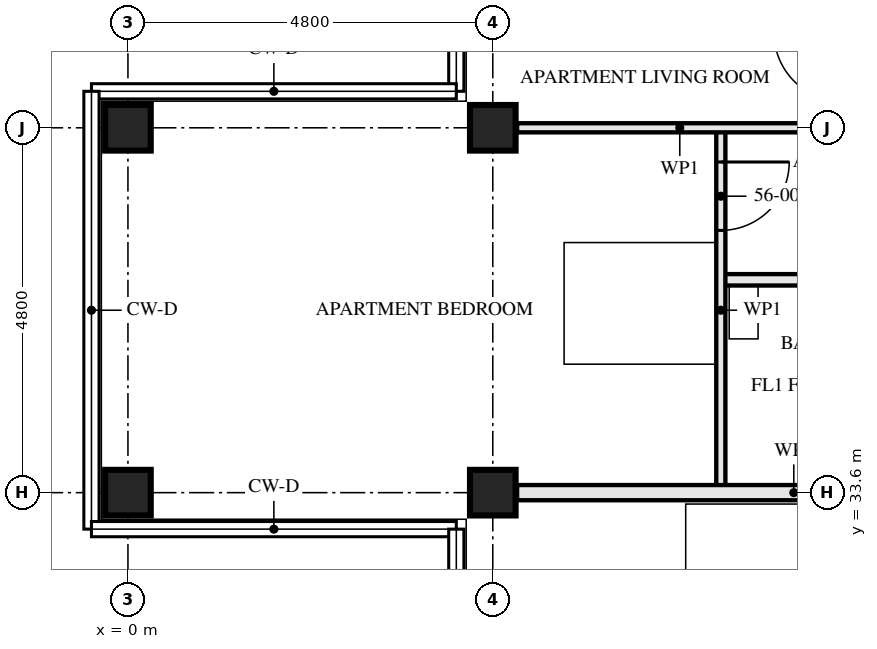
"""IFC4 building model, lengths in metres.
Left out: names, types, materials, properties, quantities, classifications, styles, units other than length and angle.
Written with IfcOpenShell. Run it as: python <this file> out.ifc"""

import sys

from ifc_helpers import new_model, si_unit, direction, frame, frame_2d, origin, origin_2d, place, context, subcontext, project, spatial, rectangle, hollow_rectangle, extrude, element, fill, save


model = new_model("IFC4")
c1 = context("Model", 3, precision=1e-05, world=origin(), true_north=direction((0.0, 1.0)))
c2 = subcontext(c1, "Body", "Model", "MODEL_VIEW")
j1 = project(units=[si_unit("LENGTHUNIT", "METRE"), si_unit("PLANEANGLEUNIT", "RADIAN")], contexts=[c1])
p1 = place(None, origin())
s1 = spatial("IfcSite", under=j1, at=p1, CompositionType="ELEMENT")
p2 = place(p1, origin())
s2 = spatial("IfcBuilding", under=s1, at=p2, CompositionType="ELEMENT")
p3 = place(p2, frame((0.0, 0.0, 205.0)))
s3 = spatial("IfcBuildingStorey", under=s2, at=p3, CompositionType="ELEMENT", Elevation=205.0)
for number, where, z_axis, x_axis in (
    (1, (0.0, 33.6, 0.0), (0.0, 0.0, 1.0), (0.0, 1.0, 0.0)),
    (2, (0.0, 38.4, 0.0), (0.0, 0.0, 1.0), (0.0, 1.0, 0.0)),
    (3, (4.8, 33.6, 0.0), (0.0, 0.0, 1.0), (0.0, 1.0, 0.0)),
    (4, (4.8, 38.4, 0.0), (0.0, 0.0, 1.0), (0.0, 1.0, 0.0)),
):
    element("IfcColumn", number, at=place(p3, frame(where, z_axis=z_axis, x_axis=x_axis)), inside=s3, PredefinedType="COLUMN", context=c2, shape_type="SweptSolid", body=[
        extrude(hollow_rectangle(XDim=0.6, YDim=0.6, WallThickness=0.05, at=origin_2d()), origin(), (0.0, 0.0, 1.0), 3.5),
    ])
p4 = place(p3, frame((7.8, 36.4, 0.0), z_axis=(0.0, 0.0, 1.0), x_axis=(1.0, 0.0, 0.0)))
e5 = element("IfcWall", 5, at=p4, inside=s3, PredefinedType="PARTITIONING", context=c2, shape_type="SweptSolid", body=[
    extrude(rectangle(XDim=3.0, YDim=0.15, at=frame_2d((1.5, 0.0))), origin(), (0.0, 0.0, 1.0), 3.33),
])
p5 = place(p4, frame((1.05, 0.0, 0.0)))
e6 = element("IfcOpeningElement", 6, at=p5, cuts=e5, PredefinedType="OPENING", context=c2, shape_type="SweptSolid", body=[
    extrude(rectangle(XDim=0.9, YDim=2.1, at=frame_2d((0.45, 1.05))), frame((0.0, 0.085, 0.0), z_axis=(0.0, -1.0, 0.0), x_axis=(1.0, 0.0, 0.0)), (0.0, 0.0, 1.0), 0.171),
])
p6 = place(p3, frame((7.8, 38.4, 0.0), z_axis=(0.0, 0.0, 1.0), x_axis=(0.0, -1.0, 0.0)))
e7 = element("IfcWall", 7, at=p6, inside=s3, PredefinedType="PARTITIONING", context=c2, shape_type="SweptSolid", body=[
    extrude(rectangle(XDim=4.8, YDim=0.12, at=frame_2d((2.4, 0.0))), origin(), (0.0, 0.0, 1.0), 3.33),
])
p7 = place(p6, frame((0.45, 0.0, 0.0)))
e8 = element("IfcOpeningElement", 8, at=p7, cuts=e7, PredefinedType="OPENING", context=c2, shape_type="SweptSolid", body=[
    extrude(rectangle(XDim=0.9, YDim=2.1, at=frame_2d((0.45, 1.05))), frame((0.0, 0.071, 0.0), z_axis=(0.0, -1.0, 0.0), x_axis=(1.0, 0.0, 0.0)), (0.0, 0.0, 1.0), 0.141),
])
p8 = place(p3, frame((5.12, 38.4, 0.0), z_axis=(0.0, 0.0, 1.0), x_axis=(1.0, 0.0, 0.0)))
e9 = element("IfcWall", 9, at=p8, inside=s3, PredefinedType="PARTITIONING", context=c2, shape_type="SweptSolid", body=[
    extrude(rectangle(XDim=4.28, YDim=0.12, at=frame_2d((2.14, 0.0))), origin(), (0.0, 0.0, 1.0), 2.55),
])
p9 = place(p3, frame((5.12, 33.6, 0.0), z_axis=(0.0, 0.0, 1.0), x_axis=(1.0, 0.0, 0.0)))
e10 = element("IfcWall", 10, at=p9, inside=s3, PredefinedType="PARTITIONING", context=c2, shape_type="SweptSolid", body=[
    extrude(rectangle(XDim=7.28, YDim=0.2, at=frame_2d((3.64, 0.0))), origin(), (0.0, 0.0, 1.0), 2.55),
])
p10 = place(p7, origin())
e11 = element("IfcDoor", 11, at=p10, inside=s3, OperationType="SINGLE_SWING_RIGHT", PredefinedType="DOOR", context=c2, shape_type="SweptSolid", body=[
    extrude(rectangle(XDim=0.9, YDim=2.1, at=frame_2d((0.45, 1.05))), frame((0.0, 0.022, 0.0), z_axis=(0.0, -1.0, 0.0), x_axis=(1.0, 0.0, 0.0)), (0.0, 0.0, 1.0), 0.044),
])
fill(e8, e11)
save(model, sys.argv[1])
